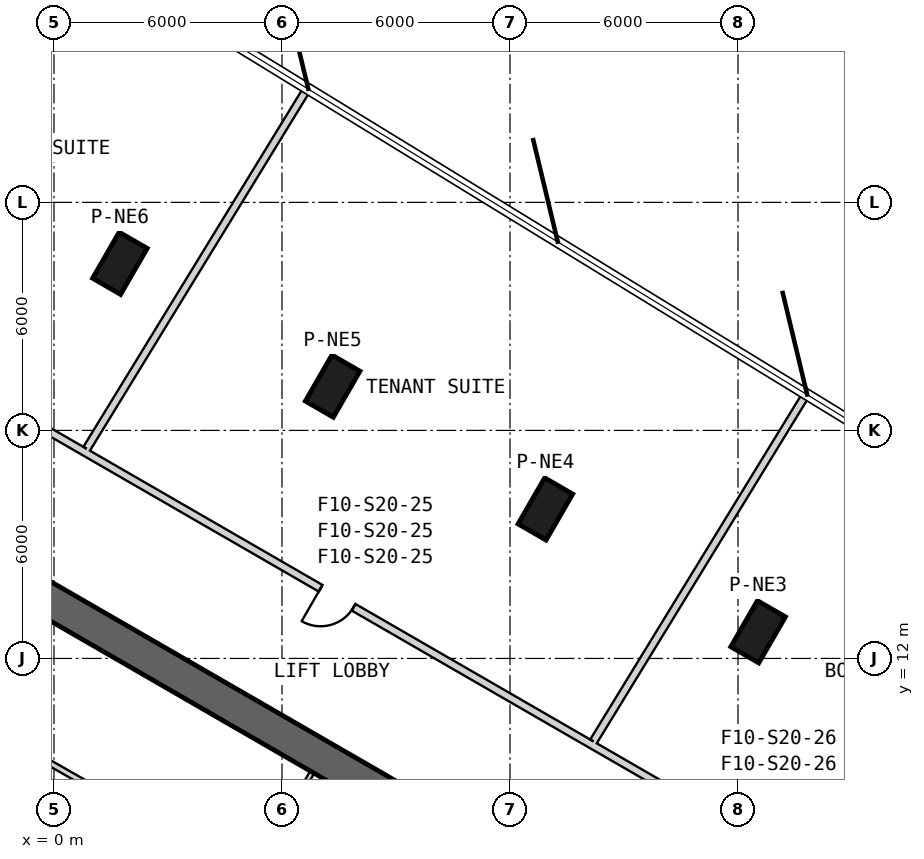
"""IFC4 building model, lengths in metres.
Left out: names, types, materials, properties, quantities, classifications, styles, units other than length and angle.
Written with IfcOpenShell. Run it as: python <this file> out.ifc"""

import sys

from ifc_helpers import new_model, si_unit, direction, frame, frame_2d, origin, origin_2d, place, context, subcontext, project, spatial, rectangle, extrude, element, fill, save


model = new_model("IFC4")
c1 = context("Model", 3, precision=1e-05, world=origin(), true_north=direction((0.0, 1.0)))
c2 = subcontext(c1, "Body", "Model", "MODEL_VIEW")
j1 = project(units=[si_unit("LENGTHUNIT", "METRE"), si_unit("PLANEANGLEUNIT", "RADIAN")], contexts=[c1])
p1 = place(None, origin())
s1 = spatial("IfcSite", under=j1, at=p1, CompositionType="ELEMENT")
p2 = place(p1, origin())
s2 = spatial("IfcBuilding", under=s1, at=p2, CompositionType="ELEMENT")
p3 = place(p2, frame((0.0, 0.0, 322.1)))
s3 = spatial("IfcBuildingStorey", under=s2, at=p3, CompositionType="ELEMENT", Elevation=322.1)
for number, where, z_axis, x_axis in (
    (1, (18.529, 12.701, 0.0), (0.0, 0.0, 1.0), (0.5, 0.866, 0.0)),
    (2, (12.931, 15.933, 0.0), (0.0, 0.0, 1.0), (0.5, 0.866, 0.0)),
    (3, (7.333, 19.165, 0.0), (0.0, 0.0, 1.0), (0.5, 0.866, 0.0)),
    (4, (1.735, 22.397, 0.0), (0.0, 0.0, 1.0), (0.5, 0.866, 0.0)),
):
    element("IfcColumn", number, at=place(p3, frame(where, z_axis=z_axis, x_axis=x_axis)), inside=s3, PredefinedType="COLUMN", context=c2, shape_type="SweptSolid", body=[
        extrude(rectangle(XDim=1.4, YDim=0.85, at=origin_2d()), origin(), (0.0, 0.0, 1.0), 3.9),
    ])
p4 = place(p3, frame((19.475, 2.208, 0.0), z_axis=(0.0, 0.0, 1.0), x_axis=(-0.866028369851, 0.499994862586, 0.0)))
e5 = element("IfcWall", 5, at=p4, inside=s3, PredefinedType="SHEAR", context=c2, shape_type="SweptSolid", body=[
    extrude(rectangle(XDim=31.523, YDim=0.9, at=frame_2d((15.762, 0.0))), origin(), (0.0, 0.0, 1.0), 3.9),
])
p5 = place(p4, frame((7.062, 0.0, 0.0)))
e6 = element("IfcOpeningElement", 6, at=p5, cuts=e5, PredefinedType="OPENING", context=c2, shape_type="SweptSolid", body=[
    extrude(rectangle(XDim=1.2, YDim=2.4, at=frame_2d((0.6, 1.2))), frame((0.0, 0.46, 0.0), z_axis=(0.0, -1.0, 0.0), x_axis=(1.0, 0.0, 0.0)), (0.0, 0.0, 1.0), 0.92),
])
p6 = place(p4, frame((3.612, 0.0, 0.0)))
e7 = element("IfcOpeningElement", 7, at=p6, cuts=e5, PredefinedType="OPENING", context=c2, shape_type="SweptSolid", body=[
    extrude(rectangle(XDim=1.2, YDim=2.4, at=frame_2d((0.6, 1.2))), frame((0.0, 0.46, 0.0), z_axis=(0.0, -1.0, 0.0), x_axis=(1.0, 0.0, 0.0)), (0.0, 0.0, 1.0), 0.92),
])
p7 = place(p4, frame((26.712, 0.0, 0.0)))
e8 = element("IfcOpeningElement", 8, at=p7, cuts=e5, PredefinedType="OPENING", context=c2, shape_type="SweptSolid", body=[
    extrude(rectangle(XDim=1.2, YDim=2.4, at=frame_2d((0.6, 1.2))), frame((0.0, 0.46, 0.0), z_axis=(0.0, -1.0, 0.0), x_axis=(1.0, 0.0, 0.0)), (0.0, 0.0, 1.0), 0.92),
])
p8 = place(p3, frame((5.17, 6.195, 0.0), z_axis=(0.0, 0.0, 1.0), x_axis=(0.499984717929, 0.866034226713, 0.0)))
e9 = element("IfcWall", 9, at=p8, inside=s3, PredefinedType="PARTITIONING", context=c2, shape_type="SweptSolid", body=[
    extrude(rectangle(XDim=3.25, YDim=0.12, at=frame_2d((1.625, 0.0))), origin(), (0.0, 0.0, 1.0), 3.6),
])
p9 = place(p8, frame((1.225, 0.0, 0.0)))
e10 = element("IfcOpeningElement", 10, at=p9, cuts=e9, PredefinedType="OPENING", context=c2, shape_type="SweptSolid", body=[
    extrude(rectangle(XDim=0.8, YDim=2.1, at=frame_2d((0.4, 1.05))), frame((0.0, 0.07, 0.0), z_axis=(0.0, -1.0, 0.0), x_axis=(1.0, 0.0, 0.0)), (0.0, 0.0, 1.0), 0.14),
])
p10 = place(p3, frame((5.159, 6.236, 0.0), z_axis=(0.0, 0.0, 1.0), x_axis=(-0.868105023632, 0.496380567654, 0.0)))
e11 = element("IfcWall", 11, at=p10, inside=s3, PredefinedType="PLUMBINGWALL", context=c2, shape_type="SweptSolid", body=[
    extrude(rectangle(XDim=7.072, YDim=0.15, at=frame_2d((3.536, 0.0))), origin(), (0.0, 0.0, 1.0), 3.6),
])
p11 = place(p3, frame((22.074, 5.153, 0.0), z_axis=(0.0, 0.0, 1.0), x_axis=(-0.866023485483, 0.500003322581, 0.0)))
e12 = element("IfcWall", 12, at=p11, inside=s3, PredefinedType="PARTITIONING", context=c2, shape_type="SweptSolid", body=[
    extrude(rectangle(XDim=32.881, YDim=0.2, at=frame_2d((16.44, 0.0))), origin(), (0.0, 0.0, 1.0), 2.97),
])
p12 = place(p11, frame((28.249, 0.0, 0.0)))
e13 = element("IfcOpeningElement", 13, at=p12, cuts=e12, PredefinedType="OPENING", context=c2, shape_type="SweptSolid", body=[
    extrude(rectangle(XDim=1.0, YDim=2.1, at=frame_2d((0.5, 1.05))), frame((0.0, 0.11, 0.0), z_axis=(0.0, -1.0, 0.0), x_axis=(1.0, 0.0, 0.0)), (0.0, 0.0, 1.0), 0.22),
])
p13 = place(p11, frame((16.387, 0.0, 0.0)))
e14 = element("IfcOpeningElement", 14, at=p13, cuts=e12, PredefinedType="OPENING", context=c2, shape_type="SweptSolid", body=[
    extrude(rectangle(XDim=1.0, YDim=2.1, at=frame_2d((0.5, 1.05))), frame((0.0, 0.11, 0.0), z_axis=(0.0, -1.0, 0.0), x_axis=(1.0, 0.0, 0.0)), (0.0, 0.0, 1.0), 0.22),
])
p14 = place(p11, frame((4.128, 0.0, 0.0)))
e15 = element("IfcOpeningElement", 15, at=p14, cuts=e12, PredefinedType="OPENING", context=c2, shape_type="SweptSolid", body=[
    extrude(rectangle(XDim=1.0, YDim=2.1, at=frame_2d((0.5, 1.05))), frame((0.0, 0.11, 0.0), z_axis=(0.0, -1.0, 0.0), x_axis=(1.0, 0.0, 0.0)), (0.0, 0.0, 1.0), 0.22),
])
p15 = place(p3, frame((0.86, 17.517, 0.0), z_axis=(0.0, 0.0, 1.0), x_axis=(0.5223859344, 0.852709174069, 0.0)))
e16 = element("IfcWall", 16, at=p15, inside=s3, PredefinedType="PARTITIONING", context=c2, shape_type="SweptSolid", body=[
    extrude(rectangle(XDim=11.117, YDim=0.2, at=frame_2d((5.559, 0.0))), origin(), (0.0, 0.0, 1.0), 2.97),
])
p16 = place(p3, frame((19.795, 18.955, 0.0), z_axis=(0.0, 0.0, 1.0), x_axis=(-0.522384145162, -0.852710270187, 0.0)))
e17 = element("IfcWall", 17, at=p16, inside=s3, PredefinedType="PARTITIONING", context=c2, shape_type="SweptSolid", body=[
    extrude(rectangle(XDim=10.716, YDim=0.2, at=frame_2d((5.358, 0.0))), origin(), (0.0, 0.0, 1.0), 2.97),
])
p17 = place(p13, origin())
e18 = element("IfcDoor", 18, at=p17, inside=s3, OperationType="SINGLE_SWING_LEFT", PredefinedType="USERDEFINED", context=c2, shape_type="SweptSolid", body=[
    extrude(rectangle(XDim=1.0, YDim=2.1, at=frame_2d((0.5, 1.05))), frame((0.0, 0.025, 0.0), z_axis=(0.0, -1.0, 0.0), x_axis=(1.0, 0.0, 0.0)), (0.0, 0.0, 1.0), 0.05),
])
fill(e14, e18)
save(model, sys.argv[1])
